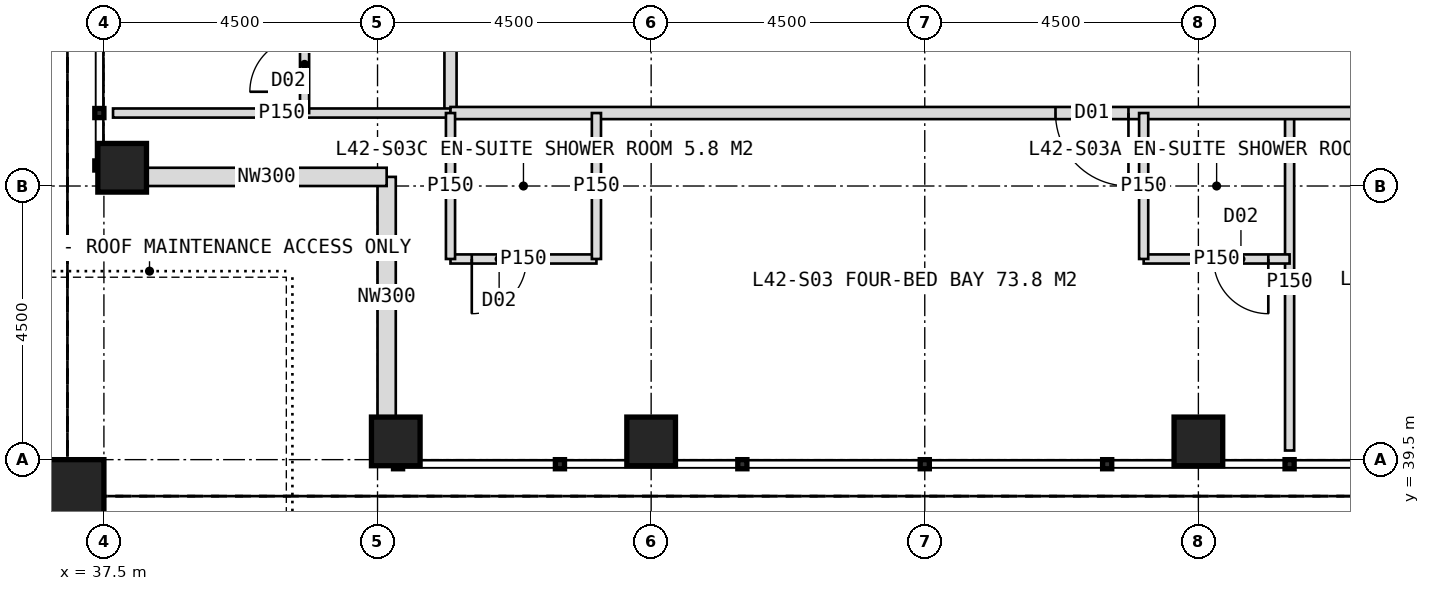
"""IFC4 building model, lengths in metres.
Left out: names, types, materials, properties, quantities, classifications, styles, units other than length and angle.
Written with IfcOpenShell. Run it as: python <this file> out.ifc"""

import sys

from ifc_helpers import new_model, si_unit, direction, frame, frame_2d, origin, origin_2d, place, context, subcontext, project, spatial, rectangle, hollow_rectangle, extrude, element, fill, save


model = new_model("IFC4")
c1 = context("Model", 3, precision=1e-05, world=origin(), true_north=direction((0.0, 1.0)))
c2 = subcontext(c1, "Body", "Model", "MODEL_VIEW")
j1 = project(units=[si_unit("LENGTHUNIT", "METRE"), si_unit("PLANEANGLEUNIT", "RADIAN")], contexts=[c1])
p1 = place(None, origin())
s1 = spatial("IfcSite", under=j1, at=p1, CompositionType="ELEMENT")
p2 = place(p1, origin())
s2 = spatial("IfcBuilding", under=s1, at=p2, CompositionType="ELEMENT")
p3 = place(p2, frame((0.0, 0.0, 177.0)))
s3 = spatial("IfcBuildingStorey", under=s2, at=p3, CompositionType="ELEMENT", Elevation=177.0)
for number, where, z_axis, x_axis in (
    (1, (42.3, 39.8, 0.0), (0.0, 0.0, 1.0), (1.0, 0.0, 0.0)),
    (2, (37.8, 44.3, 0.0), (0.0, 0.0, 1.0), (1.0, 0.0, 0.0)),
    (3, (46.5, 39.8, 0.0), (0.0, 0.0, 1.0), (1.0, 0.0, 0.0)),
    (4, (55.5, 39.8, 0.0), (0.0, 0.0, 1.0), (1.0, 0.0, 0.0)),
):
    element("IfcColumn", number, at=place(p3, frame(where, z_axis=z_axis, x_axis=x_axis)), inside=s3, PredefinedType="COLUMN", context=c2, shape_type="SweptSolid", body=[
        extrude(hollow_rectangle(XDim=0.8, YDim=0.8, WallThickness=0.08, at=origin_2d()), origin(), (0.0, 0.0, 1.0), 4.0),
    ])
p4 = place(p3, frame((36.9, 38.9, 2.0), z_axis=(0.0, 0.0, 1.0), x_axis=(1.0, 0.0, 0.0)))
e5 = element("IfcColumn", 5, at=p4, inside=s3, PredefinedType="COLUMN", context=c2, shape_type="SweptSolid", body=[
    extrude(hollow_rectangle(XDim=1.2, YDim=1.2, WallThickness=0.07, at=origin_2d()), origin(), (0.0, 0.0, 1.0), 2.0),
])
for number, where, z_axis, x_axis in (
    (6, (42.15, 40.2, 0.0), (0.0, 0.0, 1.0), (0.0, 1.0, 0.0)),
    (7, (42.15, 44.15, 0.0), (0.0, 0.0, 1.0), (-1.0, 0.0, 0.0)),
):
    element("IfcWall", number, at=place(p3, frame(where, z_axis=z_axis, x_axis=x_axis)), inside=s3, PredefinedType="ELEMENTEDWALL", context=c2, shape_type="SweptSolid", body=[
        extrude(rectangle(XDim=3.95, YDim=0.3, at=frame_2d((1.975, 0.0))), origin(), (0.0, 0.0, 1.0), 2.85),
    ])
p5 = place(p3, frame((43.2, 45.2, 0.0), z_axis=(0.0, 0.0, 1.0), x_axis=(0.0, 1.0, 0.0)))
e8 = element("IfcWall", 8, at=p5, inside=s3, PredefinedType="PARTITIONING", context=c2, shape_type="SweptSolid", body=[
    extrude(rectangle(XDim=33.6, YDim=0.2, at=frame_2d((16.8, 0.0))), origin(), (0.0, 0.0, 1.0), 3.75),
])
p6 = place(p5, frame((2.65, 0.0, 0.0)))
e9 = element("IfcOpeningElement", 9, at=p6, cuts=e8, PredefinedType="OPENING", context=c2, shape_type="SweptSolid", body=[
    extrude(rectangle(XDim=1.2, YDim=2.2, at=frame_2d((0.6, 1.1))), frame((0.0, 0.11, 0.0), z_axis=(0.0, -1.0, 0.0), x_axis=(1.0, 0.0, 0.0)), (0.0, 0.0, 1.0), 0.22),
])
p7 = place(p5, frame((13.45, 0.0, 0.0)))
e10 = element("IfcOpeningElement", 10, at=p7, cuts=e8, PredefinedType="OPENING", context=c2, shape_type="SweptSolid", body=[
    extrude(rectangle(XDim=1.2, YDim=2.2, at=frame_2d((0.6, 1.1))), frame((0.0, 0.11, 0.0), z_axis=(0.0, -1.0, 0.0), x_axis=(1.0, 0.0, 0.0)), (0.0, 0.0, 1.0), 0.22),
])
p8 = place(p5, frame((20.05, 0.0, 0.0)))
e11 = element("IfcOpeningElement", 11, at=p8, cuts=e8, PredefinedType="OPENING", context=c2, shape_type="SweptSolid", body=[
    extrude(rectangle(XDim=1.2, YDim=2.2, at=frame_2d((0.6, 1.1))), frame((0.0, 0.11, 0.0), z_axis=(0.0, -1.0, 0.0), x_axis=(1.0, 0.0, 0.0)), (0.0, 0.0, 1.0), 0.22),
])
p9 = place(p5, frame((29.05, 0.0, 0.0)))
e12 = element("IfcOpeningElement", 12, at=p9, cuts=e8, PredefinedType="OPENING", context=c2, shape_type="SweptSolid", body=[
    extrude(rectangle(XDim=1.2, YDim=2.2, at=frame_2d((0.6, 1.1))), frame((0.0, 0.11, 0.0), z_axis=(0.0, -1.0, 0.0), x_axis=(1.0, 0.0, 0.0)), (0.0, 0.0, 1.0), 0.22),
])
p10 = place(p3, frame((43.2, 45.2, 0.0), z_axis=(0.0, 0.0, 1.0), x_axis=(-1.0, 0.0, 0.0)))
e13 = element("IfcWall", 13, at=p10, inside=s3, PredefinedType="PARTITIONING", context=c2, shape_type="SweptSolid", body=[
    extrude(rectangle(XDim=5.55, YDim=0.15, at=frame_2d((2.775, 0.0))), origin(), (0.0, 0.0, 1.0), 3.75),
])
p11 = place(p3, frame((40.8, 45.2, 0.0), z_axis=(0.0, 0.0, 1.0), x_axis=(0.0, 1.0, 0.0)))
e14 = element("IfcWall", 14, at=p11, inside=s3, PredefinedType="PARTITIONING", context=c2, shape_type="SweptSolid", body=[
    extrude(rectangle(XDim=2.4, YDim=0.15, at=frame_2d((1.2, 0.0))), origin(), (0.0, 0.0, 1.0), 3.75),
])
p12 = place(p11, frame((0.35, 0.0, 0.0)))
e15 = element("IfcOpeningElement", 15, at=p12, cuts=e14, PredefinedType="OPENING", context=c2, shape_type="SweptSolid", body=[
    extrude(rectangle(XDim=0.9, YDim=2.1, at=frame_2d((0.45, 1.05))), frame((0.0, 0.085, 0.0), z_axis=(0.0, -1.0, 0.0), x_axis=(1.0, 0.0, 0.0)), (0.0, 0.0, 1.0), 0.17),
])
p13 = place(p3, frame((57.0, 45.2, 0.0), z_axis=(0.0, 0.0, 1.0), x_axis=(0.0, -1.0, 0.0)))
e16 = element("IfcWall", 16, at=p13, inside=s3, PredefinedType="PARTITIONING", context=c2, shape_type="SweptSolid", body=[
    extrude(rectangle(XDim=5.55, YDim=0.15, at=frame_2d((2.775, 0.0))), origin(), (0.0, 0.0, 1.0), 3.75),
])
p14 = place(p3, frame((76.8, 45.2, 0.0), z_axis=(0.0, 0.0, 1.0), x_axis=(-1.0, 0.0, 0.0)))
e17 = element("IfcWall", 17, at=p14, inside=s3, PredefinedType="PARTITIONING", context=c2, shape_type="SweptSolid", body=[
    extrude(rectangle(XDim=33.6, YDim=0.2, at=frame_2d((16.8, 0.0))), origin(), (0.0, 0.0, 1.0), 3.75),
])
p15 = place(p14, frame((2.65, 0.0, 0.0)))
e18 = element("IfcOpeningElement", 18, at=p15, cuts=e17, PredefinedType="OPENING", context=c2, shape_type="SweptSolid", body=[
    extrude(rectangle(XDim=1.2, YDim=2.2, at=frame_2d((0.6, 1.1))), frame((0.0, 0.11, 0.0), z_axis=(0.0, -1.0, 0.0), x_axis=(1.0, 0.0, 0.0)), (0.0, 0.0, 1.0), 0.22),
])
p16 = place(p14, frame((14.05, 0.0, 0.0)))
e19 = element("IfcOpeningElement", 19, at=p16, cuts=e17, PredefinedType="OPENING", context=c2, shape_type="SweptSolid", body=[
    extrude(rectangle(XDim=1.2, YDim=2.2, at=frame_2d((0.6, 1.1))), frame((0.0, 0.11, 0.0), z_axis=(0.0, -1.0, 0.0), x_axis=(1.0, 0.0, 0.0)), (0.0, 0.0, 1.0), 0.22),
])
p17 = place(p14, frame((22.45, 0.0, 0.0)))
e20 = element("IfcOpeningElement", 20, at=p17, cuts=e17, PredefinedType="OPENING", context=c2, shape_type="SweptSolid", body=[
    extrude(rectangle(XDim=1.2, YDim=2.2, at=frame_2d((0.6, 1.1))), frame((0.0, 0.11, 0.0), z_axis=(0.0, -1.0, 0.0), x_axis=(1.0, 0.0, 0.0)), (0.0, 0.0, 1.0), 0.22),
])
p18 = place(p3, frame((57.0, 42.8, 0.0), z_axis=(0.0, 0.0, 1.0), x_axis=(-1.0, 0.0, 0.0)))
e21 = element("IfcWall", 21, at=p18, inside=s3, PredefinedType="PARTITIONING", context=c2, shape_type="SweptSolid", body=[
    extrude(rectangle(XDim=2.4, YDim=0.15, at=frame_2d((1.2, 0.0))), origin(), (0.0, 0.0, 1.0), 3.75),
])
p19 = place(p18, frame((0.35, 0.0, 0.0)))
e22 = element("IfcOpeningElement", 22, at=p19, cuts=e21, PredefinedType="OPENING", context=c2, shape_type="SweptSolid", body=[
    extrude(rectangle(XDim=0.9, YDim=2.1, at=frame_2d((0.45, 1.05))), frame((0.0, 0.085, 0.0), z_axis=(0.0, -1.0, 0.0), x_axis=(1.0, 0.0, 0.0)), (0.0, 0.0, 1.0), 0.17),
])
p20 = place(p3, frame((54.6, 45.2, 0.0), z_axis=(0.0, 0.0, 1.0), x_axis=(0.0, -1.0, 0.0)))
e23 = element("IfcWall", 23, at=p20, inside=s3, PredefinedType="PARTITIONING", context=c2, shape_type="SweptSolid", body=[
    extrude(rectangle(XDim=2.4, YDim=0.15, at=frame_2d((1.2, 0.0))), origin(), (0.0, 0.0, 1.0), 3.75),
])
p21 = place(p3, frame((45.6, 42.8, 0.0), z_axis=(0.0, 0.0, 1.0), x_axis=(-1.0, 0.0, 0.0)))
e24 = element("IfcWall", 24, at=p21, inside=s3, PredefinedType="PARTITIONING", context=c2, shape_type="SweptSolid", body=[
    extrude(rectangle(XDim=2.4, YDim=0.15, at=frame_2d((1.2, 0.0))), origin(), (0.0, 0.0, 1.0), 3.75),
])
p22 = place(p21, frame((1.15, 0.0, 0.0)))
e25 = element("IfcOpeningElement", 25, at=p22, cuts=e24, PredefinedType="OPENING", context=c2, shape_type="SweptSolid", body=[
    extrude(rectangle(XDim=0.9, YDim=2.1, at=frame_2d((0.45, 1.05))), frame((0.0, 0.085, 0.0), z_axis=(0.0, -1.0, 0.0), x_axis=(1.0, 0.0, 0.0)), (0.0, 0.0, 1.0), 0.17),
])
for number, where, z_axis, x_axis in (
    (26, (45.6, 45.2, 0.0), (0.0, 0.0, 1.0), (0.0, -1.0, 0.0)),
    (27, (43.2, 45.2, 0.0), (0.0, 0.0, 1.0), (0.0, -1.0, 0.0)),
):
    element("IfcWall", number, at=place(p3, frame(where, z_axis=z_axis, x_axis=x_axis)), inside=s3, PredefinedType="PARTITIONING", context=c2, shape_type="SweptSolid", body=[
        extrude(rectangle(XDim=2.4, YDim=0.15, at=frame_2d((1.2, 0.0))), origin(), (0.0, 0.0, 1.0), 3.75),
    ])
p23 = place(p12, origin())
e28 = element("IfcDoor", 28, at=p23, inside=s3, OperationType="SINGLE_SWING_LEFT", PredefinedType="DOOR", context=c2, shape_type="SweptSolid", body=[
    extrude(rectangle(XDim=0.9, YDim=2.1, at=frame_2d((0.45, 1.05))), frame((0.0, 0.025, 0.0), z_axis=(0.0, -1.0, 0.0), x_axis=(1.0, 0.0, 0.0)), (0.0, 0.0, 1.0), 0.05),
])
fill(e15, e28)
p24 = place(p17, origin())
e29 = element("IfcDoor", 29, at=p24, inside=s3, OperationType="SINGLE_SWING_LEFT", PredefinedType="DOOR", context=c2, shape_type="SweptSolid", body=[
    extrude(rectangle(XDim=1.2, YDim=2.2, at=frame_2d((0.6, 1.1))), frame((0.0, 0.025, 0.0), z_axis=(0.0, -1.0, 0.0), x_axis=(1.0, 0.0, 0.0)), (0.0, 0.0, 1.0), 0.05),
])
fill(e20, e29)
p25 = place(p19, origin())
e30 = element("IfcDoor", 30, at=p25, inside=s3, OperationType="SINGLE_SWING_LEFT", PredefinedType="DOOR", context=c2, shape_type="SweptSolid", body=[
    extrude(rectangle(XDim=0.9, YDim=2.1, at=frame_2d((0.45, 1.05))), frame((0.0, 0.025, 0.0), z_axis=(0.0, -1.0, 0.0), x_axis=(1.0, 0.0, 0.0)), (0.0, 0.0, 1.0), 0.05),
])
fill(e22, e30)
p26 = place(p22, origin())
e31 = element("IfcDoor", 31, at=p26, inside=s3, OperationType="SINGLE_SWING_RIGHT", PredefinedType="DOOR", context=c2, shape_type="SweptSolid", body=[
    extrude(rectangle(XDim=0.9, YDim=2.1, at=frame_2d((0.45, 1.05))), frame((0.0, 0.025, 0.0), z_axis=(0.0, -1.0, 0.0), x_axis=(1.0, 0.0, 0.0)), (0.0, 0.0, 1.0), 0.05),
])
fill(e25, e31)
save(model, sys.argv[1])
